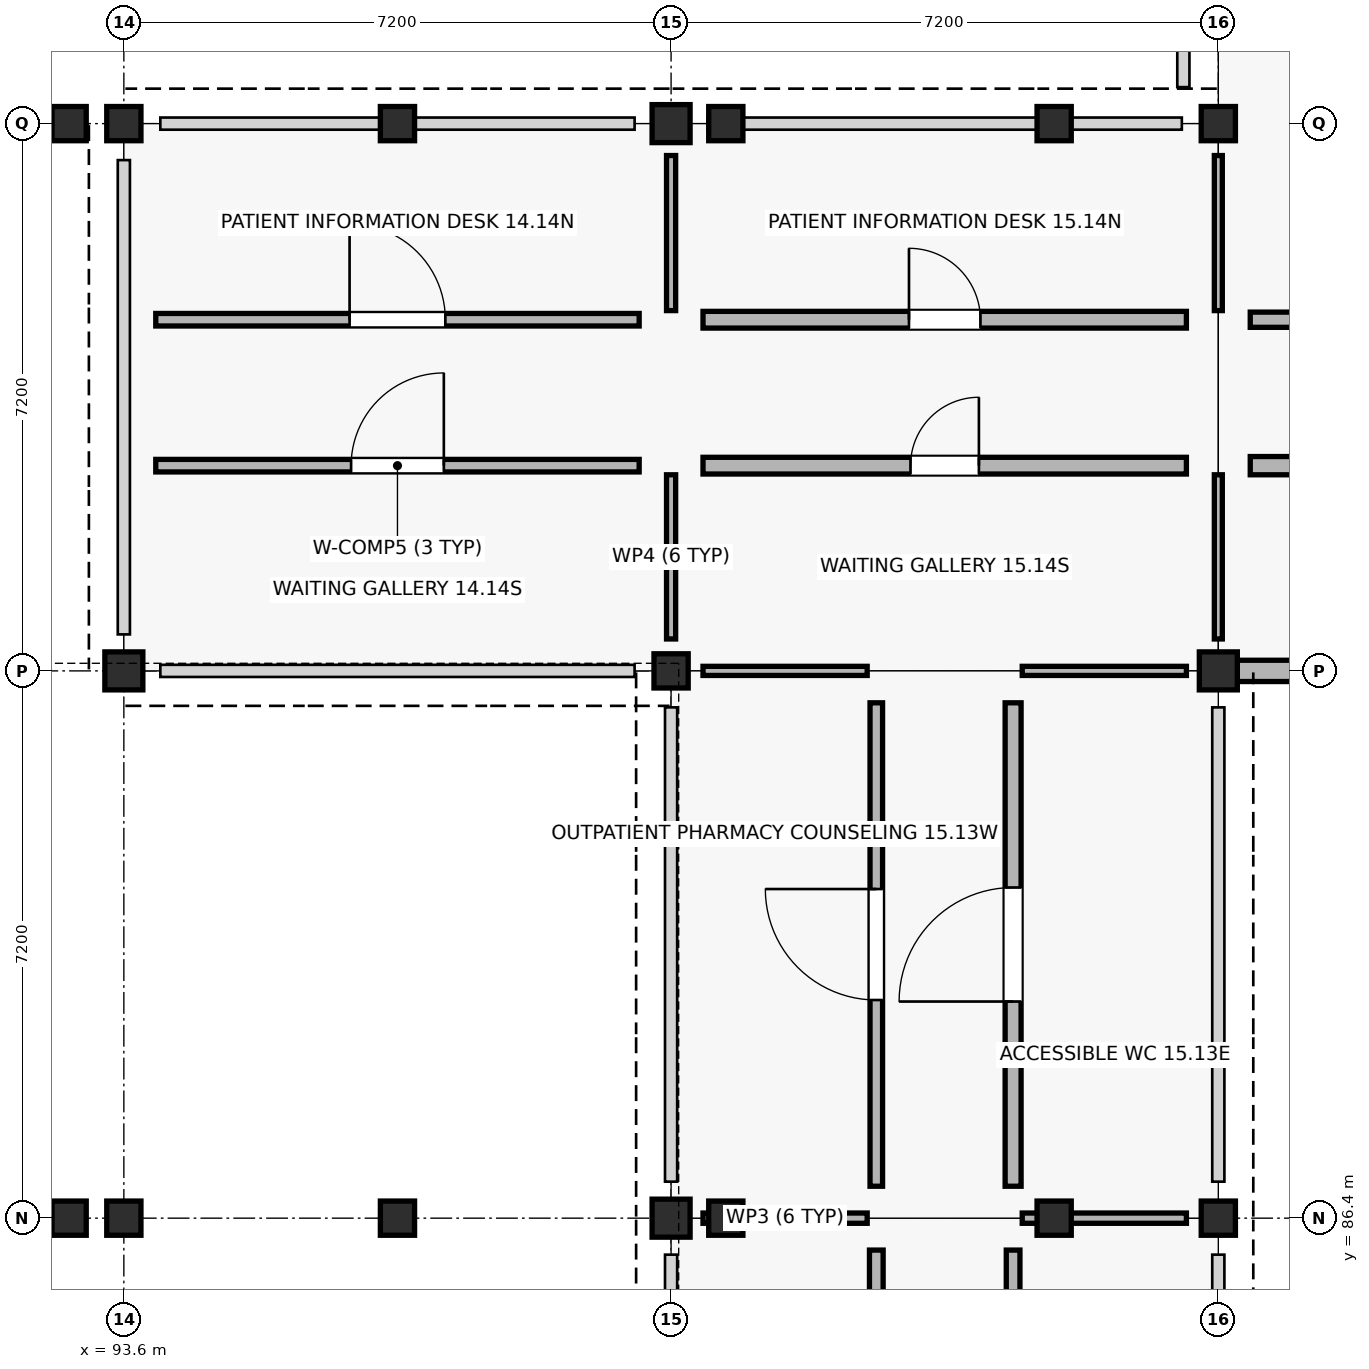
"""IFC4 building model, lengths in metres.
Left out: names, types, materials, properties, quantities, classifications, styles, units other than length and angle.
Written with IfcOpenShell. Run it as: python <this file> out.ifc"""

import sys

from ifc_helpers import new_model, si_unit, direction, frame, frame_2d, origin, origin_2d, place, context, subcontext, project, spatial, rectangle, extrude, element, fill, save


model = new_model("IFC4")
c1 = context("Model", 3, precision=1e-05, world=origin(), true_north=direction((0.0, 1.0)))
c2 = subcontext(c1, "Body", "Model", "MODEL_VIEW")
j1 = project(units=[si_unit("LENGTHUNIT", "METRE"), si_unit("PLANEANGLEUNIT", "RADIAN")], contexts=[c1])
p1 = place(None, origin())
s1 = spatial("IfcSite", under=j1, at=p1, CompositionType="ELEMENT")
p2 = place(p1, origin())
s2 = spatial("IfcBuilding", under=s1, at=p2, CompositionType="ELEMENT")
p3 = place(p2, frame((0.0, 0.0, 4.5)))
s3 = spatial("IfcBuildingStorey", under=s2, at=p3, CompositionType="ELEMENT", Elevation=4.5)
p4 = place(p3, frame((93.6, 86.4, 0.0), z_axis=(0.0, 0.0, 1.0), x_axis=(1.0, 0.0, 0.0)))
e1 = element("IfcColumn", 1, at=p4, inside=s3, PredefinedType="COLUMN", context=c2, shape_type="SweptSolid", body=[
    extrude(rectangle(XDim=0.45, YDim=0.45, at=origin_2d()), origin(), (0.0, 0.0, 1.0), 12.72),
])
p5 = place(p3, frame((93.6, 93.6, 0.0), z_axis=(0.0, 0.0, 1.0), x_axis=(1.0, 0.0, 0.0)))
e2 = element("IfcColumn", 2, at=p5, inside=s3, PredefinedType="COLUMN", context=c2, shape_type="SweptSolid", body=[
    extrude(rectangle(XDim=0.5, YDim=0.5, at=origin_2d()), origin(), (0.0, 0.0, 1.0), 4.28),
])
p6 = place(p3, frame((93.6, 100.8, 0.0), z_axis=(0.0, 0.0, 1.0), x_axis=(1.0, 0.0, 0.0)))
e3 = element("IfcColumn", 3, at=p6, inside=s3, PredefinedType="COLUMN", context=c2, shape_type="SweptSolid", body=[
    extrude(rectangle(XDim=0.45, YDim=0.45, at=origin_2d()), origin(), (0.0, 0.0, 1.0), 4.5),
])
p7 = place(p3, frame((100.8, 86.4, 0.0), z_axis=(0.0, 0.0, 1.0), x_axis=(1.0, 0.0, 0.0)))
e4 = element("IfcColumn", 4, at=p7, inside=s3, PredefinedType="COLUMN", context=c2, shape_type="SweptSolid", body=[
    extrude(rectangle(XDim=0.5, YDim=0.5, at=origin_2d()), origin(), (0.0, 0.0, 1.0), 12.72),
])
p8 = place(p3, frame((100.8, 93.6, 0.0), z_axis=(0.0, 0.0, 1.0), x_axis=(1.0, 0.0, 0.0)))
e5 = element("IfcColumn", 5, at=p8, inside=s3, PredefinedType="COLUMN", context=c2, shape_type="SweptSolid", body=[
    extrude(rectangle(XDim=0.45, YDim=0.45, at=origin_2d()), origin(), (0.0, 0.0, 1.0), 4.28),
])
p9 = place(p3, frame((100.8, 100.8, 0.0), z_axis=(0.0, 0.0, 1.0), x_axis=(1.0, 0.0, 0.0)))
e6 = element("IfcColumn", 6, at=p9, inside=s3, PredefinedType="COLUMN", context=c2, shape_type="SweptSolid", body=[
    extrude(rectangle(XDim=0.5, YDim=0.5, at=origin_2d()), origin(), (0.0, 0.0, 1.0), 4.5),
])
p10 = place(p3, frame((108.0, 86.4, 0.0), z_axis=(0.0, 0.0, 1.0), x_axis=(1.0, 0.0, 0.0)))
e7 = element("IfcColumn", 7, at=p10, inside=s3, PredefinedType="COLUMN", context=c2, shape_type="SweptSolid", body=[
    extrude(rectangle(XDim=0.45, YDim=0.45, at=origin_2d()), origin(), (0.0, 0.0, 1.0), 12.72),
])
p11 = place(p3, frame((108.0, 93.6, 0.0), z_axis=(0.0, 0.0, 1.0), x_axis=(1.0, 0.0, 0.0)))
e8 = element("IfcColumn", 8, at=p11, inside=s3, PredefinedType="COLUMN", context=c2, shape_type="SweptSolid", body=[
    extrude(rectangle(XDim=0.5, YDim=0.5, at=origin_2d()), origin(), (0.0, 0.0, 1.0), 4.28),
])
p12 = place(p3, frame((108.0, 100.8, 0.0), z_axis=(0.0, 0.0, 1.0), x_axis=(1.0, 0.0, 0.0)))
e9 = element("IfcColumn", 9, at=p12, inside=s3, PredefinedType="COLUMN", context=c2, shape_type="SweptSolid", body=[
    extrude(rectangle(XDim=0.45, YDim=0.45, at=origin_2d()), origin(), (0.0, 0.0, 1.0), 4.5),
])
p13 = place(p3, frame((92.88, 86.4, 12.295), z_axis=(0.0, 0.0, 1.0), x_axis=(1.0, 0.0, 0.0)))
e10 = element("IfcColumn", 10, at=p13, inside=s3, PredefinedType="COLUMN", context=c2, shape_type="SweptSolid", body=[
    extrude(rectangle(XDim=0.45, YDim=0.45, at=origin_2d()), origin(), (0.0, 0.0, 1.0), 3.405),
])
p14 = place(p3, frame((92.88, 100.8, 4.075), z_axis=(0.0, 0.0, 1.0), x_axis=(1.0, 0.0, 0.0)))
e11 = element("IfcColumn", 11, at=p14, inside=s3, PredefinedType="COLUMN", context=c2, shape_type="SweptSolid", body=[
    extrude(rectangle(XDim=0.45, YDim=0.45, at=origin_2d()), origin(), (0.0, 0.0, 1.0), 3.225),
])
p15 = place(p3, frame((97.2, 86.4, 12.295), z_axis=(0.0, 0.0, 1.0), x_axis=(1.0, 0.0, 0.0)))
e12 = element("IfcColumn", 12, at=p15, inside=s3, PredefinedType="COLUMN", context=c2, shape_type="SweptSolid", body=[
    extrude(rectangle(XDim=0.45, YDim=0.45, at=origin_2d()), origin(), (0.0, 0.0, 1.0), 3.405),
])
p16 = place(p3, frame((97.2, 100.8, 4.075), z_axis=(0.0, 0.0, 1.0), x_axis=(1.0, 0.0, 0.0)))
e13 = element("IfcColumn", 13, at=p16, inside=s3, PredefinedType="COLUMN", context=c2, shape_type="SweptSolid", body=[
    extrude(rectangle(XDim=0.45, YDim=0.45, at=origin_2d()), origin(), (0.0, 0.0, 1.0), 3.225),
])
p17 = place(p3, frame((101.52, 86.4, 12.295), z_axis=(0.0, 0.0, 1.0), x_axis=(1.0, 0.0, 0.0)))
e14 = element("IfcColumn", 14, at=p17, inside=s3, PredefinedType="COLUMN", context=c2, shape_type="SweptSolid", body=[
    extrude(rectangle(XDim=0.45, YDim=0.45, at=origin_2d()), origin(), (0.0, 0.0, 1.0), 3.405),
])
p18 = place(p3, frame((101.52, 100.8, 4.075), z_axis=(0.0, 0.0, 1.0), x_axis=(1.0, 0.0, 0.0)))
e15 = element("IfcColumn", 15, at=p18, inside=s3, PredefinedType="COLUMN", context=c2, shape_type="SweptSolid", body=[
    extrude(rectangle(XDim=0.45, YDim=0.45, at=origin_2d()), origin(), (0.0, 0.0, 1.0), 3.225),
])
p19 = place(p3, frame((105.84, 86.4, 12.295), z_axis=(0.0, 0.0, 1.0), x_axis=(1.0, 0.0, 0.0)))
e16 = element("IfcColumn", 16, at=p19, inside=s3, PredefinedType="COLUMN", context=c2, shape_type="SweptSolid", body=[
    extrude(rectangle(XDim=0.45, YDim=0.45, at=origin_2d()), origin(), (0.0, 0.0, 1.0), 3.405),
])
p20 = place(p3, frame((105.84, 100.8, 4.075), z_axis=(0.0, 0.0, 1.0), x_axis=(1.0, 0.0, 0.0)))
e17 = element("IfcColumn", 17, at=p20, inside=s3, PredefinedType="COLUMN", context=c2, shape_type="SweptSolid", body=[
    extrude(rectangle(XDim=0.45, YDim=0.45, at=origin_2d()), origin(), (0.0, 0.0, 1.0), 3.225),
])
p21 = place(p3, frame((108.25, 93.6, 0.0), z_axis=(0.0, 0.0, 1.0), x_axis=(1.0, 0.0, 0.0)))
e18 = element("IfcWall", 18, at=p21, inside=s3, PredefinedType="STANDARD", context=c2, shape_type="SweptSolid", body=[
    extrude(rectangle(XDim=6.725, YDim=0.28, at=frame_2d((3.363, 0.0))), origin(), (0.0, 0.0, 1.0), 3.47),
])
p22 = place(p21, frame((1.075, 0.0, 0.9)))
e19 = element("IfcOpeningElement", 19, at=p22, cuts=e18, PredefinedType="OPENING", context=c2, shape_type="SweptSolid", body=[
    extrude(rectangle(XDim=1.35, YDim=1.25, at=frame_2d((0.675, 0.625))), frame((0.0, 0.15, 0.0), z_axis=(0.0, -1.0, 0.0), x_axis=(1.0, 0.0, 0.0)), (0.0, 0.0, 1.0), 0.3),
])
p23 = place(p21, frame((4.3, 0.0, 0.9)))
e20 = element("IfcOpeningElement", 20, at=p23, cuts=e18, PredefinedType="OPENING", context=c2, shape_type="SweptSolid", body=[
    extrude(rectangle(XDim=1.35, YDim=1.25, at=frame_2d((0.675, 0.625))), frame((0.0, 0.15, 0.0), z_axis=(0.0, -1.0, 0.0), x_axis=(1.0, 0.0, 0.0)), (0.0, 0.0, 1.0), 0.3),
])
p24 = place(p3, frame((94.02, 96.3, 0.0), z_axis=(0.0, 0.0, 1.0), x_axis=(1.0, 0.0, 0.0)))
e21 = element("IfcWall", 21, at=p24, inside=s3, PredefinedType="PARTITIONING", context=c2, shape_type="SweptSolid", body=[
    extrude(rectangle(XDim=6.36, YDim=0.165, at=frame_2d((3.18, 0.0))), origin(), (0.0, 0.0, 1.0), 3.36),
])
p25 = place(p24, frame((2.57, 0.0, 0.0)))
e22 = element("IfcOpeningElement", 22, at=p25, cuts=e21, PredefinedType="OPENING", context=c2, shape_type="SweptSolid", body=[
    extrude(rectangle(XDim=1.22, YDim=2.14, at=frame_2d((0.61, 1.07))), frame((0.0, 0.093, 0.0), z_axis=(0.0, -1.0, 0.0), x_axis=(1.0, 0.0, 0.0)), (0.0, 0.0, 1.0), 0.185),
])
p26 = place(p3, frame((100.8, 94.02, 0.0), z_axis=(0.0, 0.0, 1.0), x_axis=(0.0, 1.0, 0.0)))
e23 = element("IfcWall", 23, at=p26, inside=s3, PredefinedType="PARTITIONING", context=c2, shape_type="SweptSolid", body=[
    extrude(rectangle(XDim=2.16, YDim=0.12, at=frame_2d((1.08, 0.0))), origin(), (0.0, 0.0, 1.0), 3.36),
])
p27 = place(p3, frame((94.02, 98.22, 0.0), z_axis=(0.0, 0.0, 1.0), x_axis=(1.0, 0.0, 0.0)))
e24 = element("IfcWall", 24, at=p27, inside=s3, PredefinedType="PARTITIONING", context=c2, shape_type="SweptSolid", body=[
    extrude(rectangle(XDim=6.36, YDim=0.165, at=frame_2d((3.18, 0.0))), origin(), (0.0, 0.0, 1.0), 3.36),
])
p28 = place(p27, frame((2.55, 0.0, 0.0)))
e25 = element("IfcOpeningElement", 25, at=p28, cuts=e24, PredefinedType="OPENING", context=c2, shape_type="SweptSolid", body=[
    extrude(rectangle(XDim=1.26, YDim=2.14, at=frame_2d((0.63, 1.07))), frame((0.0, 0.093, 0.0), z_axis=(0.0, -1.0, 0.0), x_axis=(1.0, 0.0, 0.0)), (0.0, 0.0, 1.0), 0.185),
])
p29 = place(p3, frame((100.8, 98.34, 0.0), z_axis=(0.0, 0.0, 1.0), x_axis=(0.0, 1.0, 0.0)))
e26 = element("IfcWall", 26, at=p29, inside=s3, PredefinedType="PARTITIONING", context=c2, shape_type="SweptSolid", body=[
    extrude(rectangle(XDim=2.04, YDim=0.12, at=frame_2d((1.02, 0.0))), origin(), (0.0, 0.0, 1.0), 3.36),
])
p30 = place(p3, frame((103.5, 79.62, 0.0), z_axis=(0.0, 0.0, 1.0), x_axis=(0.0, 1.0, 0.0)))
e27 = element("IfcWall", 27, at=p30, inside=s3, PredefinedType="PARTITIONING", context=c2, shape_type="SweptSolid", body=[
    extrude(rectangle(XDim=6.36, YDim=0.18, at=frame_2d((3.18, 0.0))), origin(), (0.0, 0.0, 1.0), 3.36),
])
p31 = place(p30, frame((2.49, 0.0, 0.0)))
e28 = element("IfcOpeningElement", 28, at=p31, cuts=e27, PredefinedType="OPENING", context=c2, shape_type="SweptSolid", body=[
    extrude(rectangle(XDim=1.38, YDim=2.14, at=frame_2d((0.69, 1.07))), frame((0.0, 0.1, 0.0), z_axis=(0.0, -1.0, 0.0), x_axis=(1.0, 0.0, 0.0)), (0.0, 0.0, 1.0), 0.2),
])
p32 = place(p3, frame((101.22, 86.4, 0.0), z_axis=(0.0, 0.0, 1.0), x_axis=(1.0, 0.0, 0.0)))
e29 = element("IfcWall", 29, at=p32, inside=s3, PredefinedType="PARTITIONING", context=c2, shape_type="SweptSolid", body=[
    extrude(rectangle(XDim=2.16, YDim=0.135, at=frame_2d((1.08, 0.0))), origin(), (0.0, 0.0, 1.0), 3.36),
])
p33 = place(p3, frame((105.3, 79.62, 0.0), z_axis=(0.0, 0.0, 1.0), x_axis=(0.0, 1.0, 0.0)))
e30 = element("IfcWall", 30, at=p33, inside=s3, PredefinedType="PARTITIONING", context=c2, shape_type="SweptSolid", body=[
    extrude(rectangle(XDim=6.36, YDim=0.18, at=frame_2d((3.18, 0.0))), origin(), (0.0, 0.0, 1.0), 3.36),
])
p34 = place(p33, frame((2.47, 0.0, 0.0)))
e31 = element("IfcOpeningElement", 31, at=p34, cuts=e30, PredefinedType="OPENING", context=c2, shape_type="SweptSolid", body=[
    extrude(rectangle(XDim=1.42, YDim=2.14, at=frame_2d((0.71, 1.07))), frame((0.0, 0.1, 0.0), z_axis=(0.0, -1.0, 0.0), x_axis=(1.0, 0.0, 0.0)), (0.0, 0.0, 1.0), 0.2),
])
p35 = place(p3, frame((105.42, 86.4, 0.0), z_axis=(0.0, 0.0, 1.0), x_axis=(1.0, 0.0, 0.0)))
e32 = element("IfcWall", 32, at=p35, inside=s3, PredefinedType="PARTITIONING", context=c2, shape_type="SweptSolid", body=[
    extrude(rectangle(XDim=2.16, YDim=0.135, at=frame_2d((1.08, 0.0))), origin(), (0.0, 0.0, 1.0), 3.36),
])
p36 = place(p3, frame((103.5, 86.82, 0.0), z_axis=(0.0, 0.0, 1.0), x_axis=(0.0, 1.0, 0.0)))
e33 = element("IfcWall", 33, at=p36, inside=s3, PredefinedType="PARTITIONING", context=c2, shape_type="SweptSolid", body=[
    extrude(rectangle(XDim=6.36, YDim=0.165, at=frame_2d((3.18, 0.0))), origin(), (0.0, 0.0, 1.0), 3.36),
])
p37 = place(p36, frame((2.45, 0.0, 0.0)))
e34 = element("IfcOpeningElement", 34, at=p37, cuts=e33, PredefinedType="OPENING", context=c2, shape_type="SweptSolid", body=[
    extrude(rectangle(XDim=1.46, YDim=2.14, at=frame_2d((0.73, 1.07))), frame((0.0, 0.093, 0.0), z_axis=(0.0, -1.0, 0.0), x_axis=(1.0, 0.0, 0.0)), (0.0, 0.0, 1.0), 0.185),
])
p38 = place(p3, frame((101.22, 93.6, 0.0), z_axis=(0.0, 0.0, 1.0), x_axis=(1.0, 0.0, 0.0)))
e35 = element("IfcWall", 35, at=p38, inside=s3, PredefinedType="PARTITIONING", context=c2, shape_type="SweptSolid", body=[
    extrude(rectangle(XDim=2.16, YDim=0.12, at=frame_2d((1.08, 0.0))), origin(), (0.0, 0.0, 1.0), 3.36),
])
p39 = place(p3, frame((105.3, 86.82, 0.0), z_axis=(0.0, 0.0, 1.0), x_axis=(0.0, 1.0, 0.0)))
e36 = element("IfcWall", 36, at=p39, inside=s3, PredefinedType="PLUMBINGWALL", context=c2, shape_type="SweptSolid", body=[
    extrude(rectangle(XDim=6.36, YDim=0.21, at=frame_2d((3.18, 0.0))), origin(), (0.0, 0.0, 1.0), 3.36),
])
p40 = place(p39, frame((2.43, 0.0, 0.0)))
e37 = element("IfcOpeningElement", 37, at=p40, cuts=e36, PredefinedType="OPENING", context=c2, shape_type="SweptSolid", body=[
    extrude(rectangle(XDim=1.5, YDim=2.14, at=frame_2d((0.75, 1.07))), frame((0.0, 0.115, 0.0), z_axis=(0.0, -1.0, 0.0), x_axis=(1.0, 0.0, 0.0)), (0.0, 0.0, 1.0), 0.23),
])
p41 = place(p3, frame((105.42, 93.6, 0.0), z_axis=(0.0, 0.0, 1.0), x_axis=(1.0, 0.0, 0.0)))
e38 = element("IfcWall", 38, at=p41, inside=s3, PredefinedType="PARTITIONING", context=c2, shape_type="SweptSolid", body=[
    extrude(rectangle(XDim=2.16, YDim=0.12, at=frame_2d((1.08, 0.0))), origin(), (0.0, 0.0, 1.0), 3.36),
])
p42 = place(p3, frame((101.22, 96.3, 0.0), z_axis=(0.0, 0.0, 1.0), x_axis=(1.0, 0.0, 0.0)))
e39 = element("IfcWall", 39, at=p42, inside=s3, PredefinedType="SOLIDWALL", context=c2, shape_type="SweptSolid", body=[
    extrude(rectangle(XDim=6.36, YDim=0.22, at=frame_2d((3.18, 0.0))), origin(), (0.0, 0.0, 1.0), 3.36),
])
p43 = place(p42, frame((2.73, 0.0, 0.0)))
e40 = element("IfcOpeningElement", 40, at=p43, cuts=e39, PredefinedType="OPENING", context=c2, shape_type="SweptSolid", body=[
    extrude(rectangle(XDim=0.9, YDim=2.19, at=frame_2d((0.45, 1.095))), frame((0.0, 0.12, 0.0), z_axis=(0.0, -1.0, 0.0), x_axis=(1.0, 0.0, 0.0)), (0.0, 0.0, 1.0), 0.24),
])
p44 = place(p3, frame((108.0, 94.02, 0.0), z_axis=(0.0, 0.0, 1.0), x_axis=(0.0, 1.0, 0.0)))
e41 = element("IfcWall", 41, at=p44, inside=s3, PredefinedType="PARTITIONING", context=c2, shape_type="SweptSolid", body=[
    extrude(rectangle(XDim=2.16, YDim=0.105, at=frame_2d((1.08, 0.0))), origin(), (0.0, 0.0, 1.0), 3.36),
])
p45 = place(p3, frame((101.22, 98.22, 0.0), z_axis=(0.0, 0.0, 1.0), x_axis=(1.0, 0.0, 0.0)))
e42 = element("IfcWall", 42, at=p45, inside=s3, PredefinedType="SOLIDWALL", context=c2, shape_type="SweptSolid", body=[
    extrude(rectangle(XDim=6.36, YDim=0.22, at=frame_2d((3.18, 0.0))), origin(), (0.0, 0.0, 1.0), 3.36),
])
p46 = place(p45, frame((2.71, 0.0, 0.0)))
e43 = element("IfcOpeningElement", 43, at=p46, cuts=e42, PredefinedType="OPENING", context=c2, shape_type="SweptSolid", body=[
    extrude(rectangle(XDim=0.94, YDim=2.19, at=frame_2d((0.47, 1.095))), frame((0.0, 0.12, 0.0), z_axis=(0.0, -1.0, 0.0), x_axis=(1.0, 0.0, 0.0)), (0.0, 0.0, 1.0), 0.24),
])
p47 = place(p3, frame((108.0, 98.34, 0.0), z_axis=(0.0, 0.0, 1.0), x_axis=(0.0, 1.0, 0.0)))
e44 = element("IfcWall", 44, at=p47, inside=s3, PredefinedType="PARTITIONING", context=c2, shape_type="SweptSolid", body=[
    extrude(rectangle(XDim=2.04, YDim=0.105, at=frame_2d((1.02, 0.0))), origin(), (0.0, 0.0, 1.0), 3.36),
])
p48 = place(p3, frame((108.42, 96.3, 0.0), z_axis=(0.0, 0.0, 1.0), x_axis=(1.0, 0.0, 0.0)))
e45 = element("IfcWall", 45, at=p48, inside=s3, PredefinedType="SOLIDWALL", context=c2, shape_type="SweptSolid", body=[
    extrude(rectangle(XDim=6.36, YDim=0.24, at=frame_2d((3.18, 0.0))), origin(), (0.0, 0.0, 1.0), 3.36),
])
p49 = place(p48, frame((2.505, 0.0, 0.0)))
e46 = element("IfcOpeningElement", 46, at=p49, cuts=e45, PredefinedType="OPENING", context=c2, shape_type="SweptSolid", body=[
    extrude(rectangle(XDim=1.35, YDim=2.2, at=frame_2d((0.675, 1.1))), frame((0.0, 0.13, 0.0), z_axis=(0.0, -1.0, 0.0), x_axis=(1.0, 0.0, 0.0)), (0.0, 0.0, 1.0), 0.26),
])
p50 = place(p3, frame((108.42, 98.22, 0.0), z_axis=(0.0, 0.0, 1.0), x_axis=(1.0, 0.0, 0.0)))
e47 = element("IfcWall", 47, at=p50, inside=s3, PredefinedType="SOLIDWALL", context=c2, shape_type="SweptSolid", body=[
    extrude(rectangle(XDim=6.36, YDim=0.2, at=frame_2d((3.18, 0.0))), origin(), (0.0, 0.0, 1.0), 3.36),
])
p51 = place(p50, frame((2.73, 0.0, 0.0)))
e48 = element("IfcOpeningElement", 48, at=p51, cuts=e47, PredefinedType="OPENING", context=c2, shape_type="SweptSolid", body=[
    extrude(rectangle(XDim=0.9, YDim=2.09, at=frame_2d((0.45, 1.045))), frame((0.0, 0.11, 0.0), z_axis=(0.0, -1.0, 0.0), x_axis=(1.0, 0.0, 0.0)), (0.0, 0.0, 1.0), 0.22),
])
p52 = place(p25, origin())
e49 = element("IfcDoor", 49, at=p52, inside=s3, OperationType="SINGLE_SWING_RIGHT", PredefinedType="DOOR", context=c2, shape_type="SweptSolid", body=[
    extrude(rectangle(XDim=1.22, YDim=2.14, at=frame_2d((0.61, 1.07))), frame((0.0, 0.025, 0.0), z_axis=(0.0, -1.0, 0.0), x_axis=(1.0, 0.0, 0.0)), (0.0, 0.0, 1.0), 0.05),
])
fill(e22, e49)
p53 = place(p28, origin())
e50 = element("IfcDoor", 50, at=p53, inside=s3, OperationType="SINGLE_SWING_LEFT", PredefinedType="DOOR", context=c2, shape_type="SweptSolid", body=[
    extrude(rectangle(XDim=1.26, YDim=2.14, at=frame_2d((0.63, 1.07))), frame((0.0, 0.025, 0.0), z_axis=(0.0, -1.0, 0.0), x_axis=(1.0, 0.0, 0.0)), (0.0, 0.0, 1.0), 0.05),
])
fill(e25, e50)
p54 = place(p37, origin())
e51 = element("IfcDoor", 51, at=p54, inside=s3, OperationType="SINGLE_SWING_RIGHT", PredefinedType="DOOR", context=c2, shape_type="SweptSolid", body=[
    extrude(rectangle(XDim=1.46, YDim=2.14, at=frame_2d((0.73, 1.07))), frame((0.0, 0.025, 0.0), z_axis=(0.0, -1.0, 0.0), x_axis=(1.0, 0.0, 0.0)), (0.0, 0.0, 1.0), 0.05),
])
fill(e34, e51)
p55 = place(p40, origin())
e52 = element("IfcDoor", 52, at=p55, inside=s3, OperationType="SINGLE_SWING_LEFT", PredefinedType="DOOR", context=c2, shape_type="SweptSolid", body=[
    extrude(rectangle(XDim=1.5, YDim=2.14, at=frame_2d((0.75, 1.07))), frame((0.0, 0.025, 0.0), z_axis=(0.0, -1.0, 0.0), x_axis=(1.0, 0.0, 0.0)), (0.0, 0.0, 1.0), 0.05),
])
fill(e37, e52)
p56 = place(p43, origin())
e53 = element("IfcDoor", 53, at=p56, inside=s3, OperationType="SINGLE_SWING_RIGHT", PredefinedType="DOOR", context=c2, shape_type="SweptSolid", body=[
    extrude(rectangle(XDim=0.9, YDim=2.19, at=frame_2d((0.45, 1.095))), frame((0.0, 0.025, 0.0), z_axis=(0.0, -1.0, 0.0), x_axis=(1.0, 0.0, 0.0)), (0.0, 0.0, 1.0), 0.05),
])
fill(e40, e53)
p57 = place(p46, origin())
e54 = element("IfcDoor", 54, at=p57, inside=s3, OperationType="SINGLE_SWING_LEFT", PredefinedType="DOOR", context=c2, shape_type="SweptSolid", body=[
    extrude(rectangle(XDim=0.94, YDim=2.19, at=frame_2d((0.47, 1.095))), frame((0.0, 0.025, 0.0), z_axis=(0.0, -1.0, 0.0), x_axis=(1.0, 0.0, 0.0)), (0.0, 0.0, 1.0), 0.05),
])
fill(e43, e54)
save(model, sys.argv[1])
